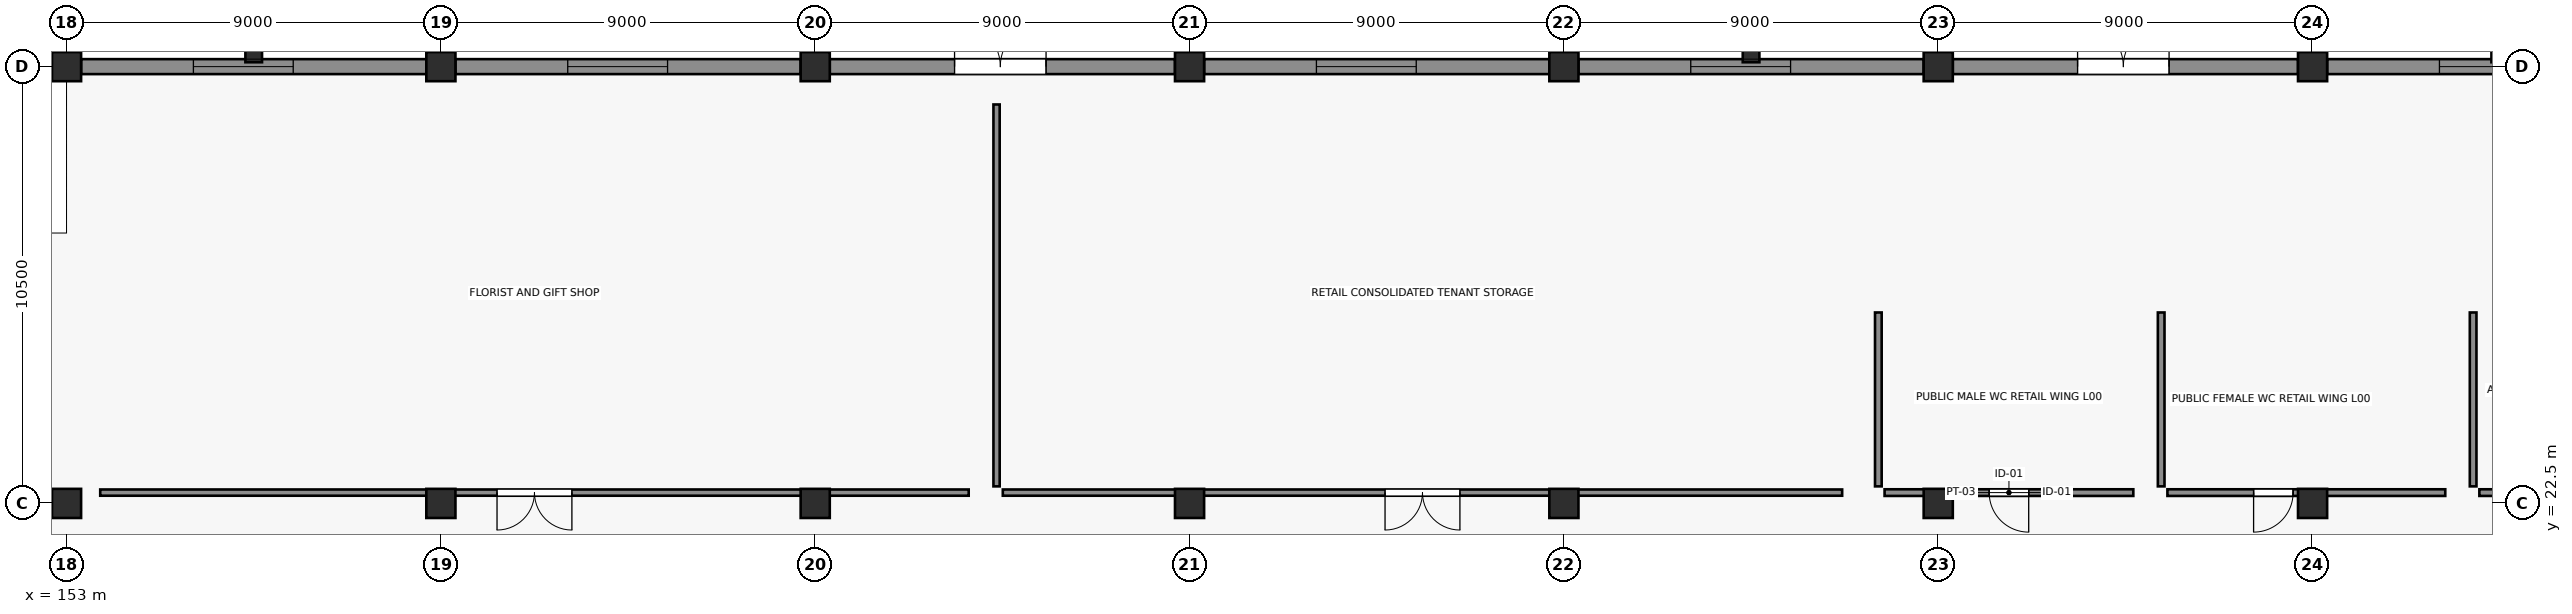
"""IFC4 building model, lengths in metres.
Left out: names, types, materials, properties, quantities, classifications, styles, units other than length and angle.
Written with IfcOpenShell. Run it as: python <this file> out.ifc"""

import sys

from ifc_helpers import new_model, si_unit, direction, frame, frame_2d, origin, origin_2d, place, context, subcontext, project, spatial, rectangle, extrude, element, fill, save


model = new_model("IFC4")
c1 = context("Model", 3, precision=1e-05, world=origin(), true_north=direction((0.0, 1.0)))
c2 = subcontext(c1, "Body", "Model", "MODEL_VIEW")
j1 = project(units=[si_unit("LENGTHUNIT", "METRE"), si_unit("PLANEANGLEUNIT", "RADIAN")], contexts=[c1])
p1 = place(None, origin())
s1 = spatial("IfcSite", under=j1, at=p1, CompositionType="ELEMENT")
p2 = place(p1, origin())
s2 = spatial("IfcBuilding", under=s1, at=p2, CompositionType="ELEMENT")
p3 = place(p2, origin())
s3 = spatial("IfcBuildingStorey", under=s2, at=p3, CompositionType="ELEMENT", Elevation=0.0)
for number, where, z_axis, x_axis in (
    (1, (153.0, 22.5, 0.0), (0.0, 0.0, 1.0), (1.0, 0.0, 0.0)),
    (2, (153.0, 33.0, 0.0), (0.0, 0.0, 1.0), (1.0, 0.0, 0.0)),
    (3, (162.0, 22.5, 0.0), (0.0, 0.0, 1.0), (1.0, 0.0, 0.0)),
    (4, (162.0, 33.0, 0.0), (0.0, 0.0, 1.0), (1.0, 0.0, 0.0)),
    (5, (171.0, 22.5, 0.0), (0.0, 0.0, 1.0), (1.0, 0.0, 0.0)),
    (6, (171.0, 33.0, 0.0), (0.0, 0.0, 1.0), (1.0, 0.0, 0.0)),
    (7, (180.0, 22.5, 0.0), (0.0, 0.0, 1.0), (1.0, 0.0, 0.0)),
    (8, (180.0, 33.0, 0.0), (0.0, 0.0, 1.0), (1.0, 0.0, 0.0)),
    (9, (189.0, 22.5, 0.0), (0.0, 0.0, 1.0), (1.0, 0.0, 0.0)),
    (10, (189.0, 33.0, 0.0), (0.0, 0.0, 1.0), (1.0, 0.0, 0.0)),
    (11, (198.0, 22.5, 0.0), (0.0, 0.0, 1.0), (1.0, 0.0, 0.0)),
    (12, (198.0, 33.0, 0.0), (0.0, 0.0, 1.0), (1.0, 0.0, 0.0)),
    (13, (207.0, 22.5, 0.0), (0.0, 0.0, 1.0), (1.0, 0.0, 0.0)),
    (14, (207.0, 33.0, 0.0), (0.0, 0.0, 1.0), (1.0, 0.0, 0.0)),
):
    element("IfcColumn", number, at=place(p3, frame(where, z_axis=z_axis, x_axis=x_axis)), inside=s3, PredefinedType="COLUMN", context=c2, shape_type="SweptSolid", body=[
        extrude(rectangle(XDim=0.7, YDim=0.7, at=origin_2d()), origin(), (0.0, 0.0, 1.0), 4.605),
    ])
for number, where, z_axis, x_axis in (
    (15, (157.5, 33.38, 0.0), (0.0, 0.0, 1.0), (1.0, 0.0, 0.0)),
    (16, (193.5, 33.38, 0.0), (0.0, 0.0, 1.0), (1.0, 0.0, 0.0)),
    (17, (211.5, 33.38, 0.0), (0.0, 0.0, 1.0), (1.0, 0.0, 0.0)),
):
    element("IfcColumn", number, at=place(p3, frame(where, z_axis=z_axis, x_axis=x_axis)), inside=s3, PredefinedType="PILASTER", context=c2, shape_type="SweptSolid", body=[
        extrude(rectangle(XDim=0.4, YDim=0.55, at=origin_2d()), origin(), (0.0, 0.0, 1.0), 4.8),
    ])
p4 = place(p3, frame((153.35, 33.0, 0.0), z_axis=(0.0, 0.0, 1.0), x_axis=(1.0, 0.0, 0.0)))
e18 = element("IfcWall", 18, at=p4, inside=s3, PredefinedType="SOLIDWALL", context=c2, shape_type="SweptSolid", body=[
    extrude(rectangle(XDim=8.3, YDim=0.36, at=frame_2d((4.15, 0.0))), origin(), (0.0, 0.0, 1.0), 4.15),
])
p5 = place(p4, frame((2.7, 0.0, 1.1)))
e19 = element("IfcOpeningElement", 19, at=p5, cuts=e18, PredefinedType="OPENING", context=c2, shape_type="SweptSolid", body=[
    extrude(rectangle(XDim=2.4, YDim=1.6, at=frame_2d((1.2, 0.8))), frame((0.0, 0.19, 0.0), z_axis=(0.0, -1.0, 0.0), x_axis=(1.0, 0.0, 0.0)), (0.0, 0.0, 1.0), 0.38),
])
p6 = place(p3, frame((162.35, 33.0, 0.0), z_axis=(0.0, 0.0, 1.0), x_axis=(1.0, 0.0, 0.0)))
e20 = element("IfcWall", 20, at=p6, inside=s3, PredefinedType="SOLIDWALL", context=c2, shape_type="SweptSolid", body=[
    extrude(rectangle(XDim=8.3, YDim=0.36, at=frame_2d((4.15, 0.0))), origin(), (0.0, 0.0, 1.0), 4.15),
])
p7 = place(p6, frame((2.7, 0.0, 1.1)))
e21 = element("IfcOpeningElement", 21, at=p7, cuts=e20, PredefinedType="OPENING", context=c2, shape_type="SweptSolid", body=[
    extrude(rectangle(XDim=2.4, YDim=1.6, at=frame_2d((1.2, 0.8))), frame((0.0, 0.19, 0.0), z_axis=(0.0, -1.0, 0.0), x_axis=(1.0, 0.0, 0.0)), (0.0, 0.0, 1.0), 0.38),
])
p8 = place(p3, frame((171.35, 33.0, 0.0), z_axis=(0.0, 0.0, 1.0), x_axis=(1.0, 0.0, 0.0)))
e22 = element("IfcWall", 22, at=p8, inside=s3, PredefinedType="SOLIDWALL", context=c2, shape_type="SweptSolid", body=[
    extrude(rectangle(XDim=8.3, YDim=0.36, at=frame_2d((4.15, 0.0))), origin(), (0.0, 0.0, 1.0), 4.15),
])
p9 = place(p8, frame((3.0, 0.0, 0.0)))
e23 = element("IfcOpeningElement", 23, at=p9, cuts=e22, PredefinedType="OPENING", context=c2, shape_type="SweptSolid", body=[
    extrude(rectangle(XDim=2.2, YDim=2.4, at=frame_2d((1.1, 1.2))), frame((0.0, 0.19, 0.0), z_axis=(0.0, -1.0, 0.0), x_axis=(1.0, 0.0, 0.0)), (0.0, 0.0, 1.0), 0.38),
])
p10 = place(p3, frame((180.35, 33.0, 0.0), z_axis=(0.0, 0.0, 1.0), x_axis=(1.0, 0.0, 0.0)))
e24 = element("IfcWall", 24, at=p10, inside=s3, PredefinedType="SOLIDWALL", context=c2, shape_type="SweptSolid", body=[
    extrude(rectangle(XDim=8.3, YDim=0.36, at=frame_2d((4.15, 0.0))), origin(), (0.0, 0.0, 1.0), 4.15),
])
p11 = place(p10, frame((2.7, 0.0, 1.1)))
e25 = element("IfcOpeningElement", 25, at=p11, cuts=e24, PredefinedType="OPENING", context=c2, shape_type="SweptSolid", body=[
    extrude(rectangle(XDim=2.4, YDim=1.6, at=frame_2d((1.2, 0.8))), frame((0.0, 0.19, 0.0), z_axis=(0.0, -1.0, 0.0), x_axis=(1.0, 0.0, 0.0)), (0.0, 0.0, 1.0), 0.38),
])
p12 = place(p3, frame((189.35, 33.0, 0.0), z_axis=(0.0, 0.0, 1.0), x_axis=(1.0, 0.0, 0.0)))
e26 = element("IfcWall", 26, at=p12, inside=s3, PredefinedType="SOLIDWALL", context=c2, shape_type="SweptSolid", body=[
    extrude(rectangle(XDim=8.3, YDim=0.36, at=frame_2d((4.15, 0.0))), origin(), (0.0, 0.0, 1.0), 4.15),
])
p13 = place(p12, frame((2.7, 0.0, 1.1)))
e27 = element("IfcOpeningElement", 27, at=p13, cuts=e26, PredefinedType="OPENING", context=c2, shape_type="SweptSolid", body=[
    extrude(rectangle(XDim=2.4, YDim=1.6, at=frame_2d((1.2, 0.8))), frame((0.0, 0.19, 0.0), z_axis=(0.0, -1.0, 0.0), x_axis=(1.0, 0.0, 0.0)), (0.0, 0.0, 1.0), 0.38),
])
p14 = place(p3, frame((198.35, 33.0, 0.0), z_axis=(0.0, 0.0, 1.0), x_axis=(1.0, 0.0, 0.0)))
e28 = element("IfcWall", 28, at=p14, inside=s3, PredefinedType="SOLIDWALL", context=c2, shape_type="SweptSolid", body=[
    extrude(rectangle(XDim=8.3, YDim=0.36, at=frame_2d((4.15, 0.0))), origin(), (0.0, 0.0, 1.0), 4.15),
])
p15 = place(p14, frame((3.0, 0.0, 0.0)))
e29 = element("IfcOpeningElement", 29, at=p15, cuts=e28, PredefinedType="OPENING", context=c2, shape_type="SweptSolid", body=[
    extrude(rectangle(XDim=2.2, YDim=2.4, at=frame_2d((1.1, 1.2))), frame((0.0, 0.19, 0.0), z_axis=(0.0, -1.0, 0.0), x_axis=(1.0, 0.0, 0.0)), (0.0, 0.0, 1.0), 0.38),
])
p16 = place(p3, frame((207.35, 33.0, 0.0), z_axis=(0.0, 0.0, 1.0), x_axis=(1.0, 0.0, 0.0)))
e30 = element("IfcWall", 30, at=p16, inside=s3, PredefinedType="SOLIDWALL", context=c2, shape_type="SweptSolid", body=[
    extrude(rectangle(XDim=8.3, YDim=0.36, at=frame_2d((4.15, 0.0))), origin(), (0.0, 0.0, 1.0), 4.15),
])
p17 = place(p16, frame((2.7, 0.0, 1.1)))
e31 = element("IfcOpeningElement", 31, at=p17, cuts=e30, PredefinedType="OPENING", context=c2, shape_type="SweptSolid", body=[
    extrude(rectangle(XDim=2.4, YDim=1.6, at=frame_2d((1.2, 0.8))), frame((0.0, 0.19, 0.0), z_axis=(0.0, -1.0, 0.0), x_axis=(1.0, 0.0, 0.0)), (0.0, 0.0, 1.0), 0.38),
])
p18 = place(p3, frame((174.69, 22.76, 0.0), z_axis=(0.0, 0.0, 1.0), x_axis=(-1.0, 0.0, 0.0)))
e32 = element("IfcWall", 32, at=p18, inside=s3, PredefinedType="PARTITIONING", context=c2, shape_type="SweptSolid", body=[
    extrude(rectangle(XDim=20.88, YDim=0.15, at=frame_2d((10.44, 0.0))), origin(), (0.0, 0.0, 1.0), 3.975),
])
p19 = place(p18, frame((9.54, 0.0, 0.0)))
e33 = element("IfcOpeningElement", 33, at=p19, cuts=e32, PredefinedType="OPENING", context=c2, shape_type="SweptSolid", body=[
    extrude(rectangle(XDim=1.8, YDim=2.3, at=frame_2d((0.9, 1.15))), frame((0.0, 0.085, 0.0), z_axis=(0.0, -1.0, 0.0), x_axis=(1.0, 0.0, 0.0)), (0.0, 0.0, 1.0), 0.17),
])
p20 = place(p3, frame((195.69, 22.76, 0.0), z_axis=(0.0, 0.0, 1.0), x_axis=(-1.0, 0.0, 0.0)))
e34 = element("IfcWall", 34, at=p20, inside=s3, PredefinedType="PARTITIONING", context=c2, shape_type="SweptSolid", body=[
    extrude(rectangle(XDim=20.18, YDim=0.15, at=frame_2d((10.09, 0.0))), origin(), (0.0, 0.0, 1.0), 3.975),
])
p21 = place(p20, frame((9.19, 0.0, 0.0)))
e35 = element("IfcOpeningElement", 35, at=p21, cuts=e34, PredefinedType="OPENING", context=c2, shape_type="SweptSolid", body=[
    extrude(rectangle(XDim=1.8, YDim=2.3, at=frame_2d((0.9, 1.15))), frame((0.0, 0.085, 0.0), z_axis=(0.0, -1.0, 0.0), x_axis=(1.0, 0.0, 0.0)), (0.0, 0.0, 1.0), 0.17),
])
p22 = place(p3, frame((175.36, 22.91, 0.0), z_axis=(0.0, 0.0, 1.0), x_axis=(0.0, 1.0, 0.0)))
e36 = element("IfcWall", 36, at=p22, inside=s3, PredefinedType="PARTITIONING", context=c2, shape_type="SweptSolid", body=[
    extrude(rectangle(XDim=9.18, YDim=0.15, at=frame_2d((4.59, 0.0))), origin(), (0.0, 0.0, 1.0), 4.55),
])
p23 = place(p3, frame((202.69, 22.76, 0.0), z_axis=(0.0, 0.0, 1.0), x_axis=(-1.0, 0.0, 0.0)))
e37 = element("IfcWall", 37, at=p23, inside=s3, PredefinedType="PARTITIONING", context=c2, shape_type="SweptSolid", body=[
    extrude(rectangle(XDim=5.98, YDim=0.16, at=frame_2d((2.99, 0.0))), origin(), (0.0, 0.0, 1.0), 3.975),
])
p24 = place(p23, frame((2.515, 0.0, 0.0)))
e38 = element("IfcOpeningElement", 38, at=p24, cuts=e37, PredefinedType="OPENING", context=c2, shape_type="SweptSolid", body=[
    extrude(rectangle(XDim=0.95, YDim=2.15, at=frame_2d((0.475, 1.075))), frame((0.0, 0.09, 0.0), z_axis=(0.0, -1.0, 0.0), x_axis=(1.0, 0.0, 0.0)), (0.0, 0.0, 1.0), 0.18),
])
p25 = place(p3, frame((196.56, 22.91, 0.0), z_axis=(0.0, 0.0, 1.0), x_axis=(0.0, 1.0, 0.0)))
e39 = element("IfcWall", 39, at=p25, inside=s3, PredefinedType="PARTITIONING", context=c2, shape_type="SweptSolid", body=[
    extrude(rectangle(XDim=4.18, YDim=0.16, at=frame_2d((2.09, 0.0))), origin(), (0.0, 0.0, 1.0), 4.55),
])
p26 = place(p3, frame((210.19, 22.76, 0.0), z_axis=(0.0, 0.0, 1.0), x_axis=(-1.0, 0.0, 0.0)))
e40 = element("IfcWall", 40, at=p26, inside=s3, PredefinedType="PARTITIONING", context=c2, shape_type="SweptSolid", body=[
    extrude(rectangle(XDim=6.68, YDim=0.16, at=frame_2d((3.34, 0.0))), origin(), (0.0, 0.0, 1.0), 3.975),
])
p27 = place(p26, frame((3.658, 0.0, 0.0)))
e41 = element("IfcOpeningElement", 41, at=p27, cuts=e40, PredefinedType="OPENING", context=c2, shape_type="SweptSolid", body=[
    extrude(rectangle(XDim=0.95, YDim=2.15, at=frame_2d((0.475, 1.075))), frame((0.0, 0.09, 0.0), z_axis=(0.0, -1.0, 0.0), x_axis=(1.0, 0.0, 0.0)), (0.0, 0.0, 1.0), 0.18),
])
p28 = place(p3, frame((203.36, 22.91, 0.0), z_axis=(0.0, 0.0, 1.0), x_axis=(0.0, 1.0, 0.0)))
e42 = element("IfcWall", 42, at=p28, inside=s3, PredefinedType="PARTITIONING", context=c2, shape_type="SweptSolid", body=[
    extrude(rectangle(XDim=4.18, YDim=0.16, at=frame_2d((2.09, 0.0))), origin(), (0.0, 0.0, 1.0), 4.55),
])
p29 = place(p3, frame((215.19, 22.76, 0.0), z_axis=(0.0, 0.0, 1.0), x_axis=(-1.0, 0.0, 0.0)))
e43 = element("IfcWall", 43, at=p29, inside=s3, PredefinedType="PARTITIONING", context=c2, shape_type="SweptSolid", body=[
    extrude(rectangle(XDim=4.18, YDim=0.16, at=frame_2d((2.09, 0.0))), origin(), (0.0, 0.0, 1.0), 3.975),
])
p30 = place(p29, frame((1.565, 0.0, 0.0)))
e44 = element("IfcOpeningElement", 44, at=p30, cuts=e43, PredefinedType="OPENING", context=c2, shape_type="SweptSolid", body=[
    extrude(rectangle(XDim=1.05, YDim=2.2, at=frame_2d((0.525, 1.1))), frame((0.0, 0.09, 0.0), z_axis=(0.0, -1.0, 0.0), x_axis=(1.0, 0.0, 0.0)), (0.0, 0.0, 1.0), 0.18),
])
p31 = place(p3, frame((210.86, 22.91, 0.0), z_axis=(0.0, 0.0, 1.0), x_axis=(0.0, 1.0, 0.0)))
e45 = element("IfcWall", 45, at=p31, inside=s3, PredefinedType="PARTITIONING", context=c2, shape_type="SweptSolid", body=[
    extrude(rectangle(XDim=4.18, YDim=0.16, at=frame_2d((2.09, 0.0))), origin(), (0.0, 0.0, 1.0), 4.55),
])
p32 = place(p5, origin())
e46 = element("IfcWindow", 46, at=p32, inside=s3, PartitioningType="SINGLE_PANEL", PredefinedType="WINDOW", context=c2, shape_type="SweptSolid", body=[
    extrude(rectangle(XDim=2.4, YDim=1.6, at=frame_2d((1.2, 0.8))), frame((0.0, 0.03, 0.0), z_axis=(0.0, -1.0, 0.0), x_axis=(1.0, 0.0, 0.0)), (0.0, 0.0, 1.0), 0.06),
])
fill(e19, e46)
p33 = place(p7, origin())
e47 = element("IfcWindow", 47, at=p33, inside=s3, PartitioningType="SINGLE_PANEL", PredefinedType="WINDOW", context=c2, shape_type="SweptSolid", body=[
    extrude(rectangle(XDim=2.4, YDim=1.6, at=frame_2d((1.2, 0.8))), frame((0.0, 0.03, 0.0), z_axis=(0.0, -1.0, 0.0), x_axis=(1.0, 0.0, 0.0)), (0.0, 0.0, 1.0), 0.06),
])
fill(e21, e47)
p34 = place(p9, origin())
e48 = element("IfcDoor", 48, at=p34, inside=s3, OperationType="DOUBLE_DOOR_SINGLE_SWING", PredefinedType="DOOR", context=c2, shape_type="SweptSolid", body=[
    extrude(rectangle(XDim=2.2, YDim=2.4, at=frame_2d((1.1, 1.2))), frame((0.0, 0.025, 0.0), z_axis=(0.0, -1.0, 0.0), x_axis=(1.0, 0.0, 0.0)), (0.0, 0.0, 1.0), 0.05),
])
fill(e23, e48)
p35 = place(p11, origin())
e49 = element("IfcWindow", 49, at=p35, inside=s3, PartitioningType="SINGLE_PANEL", PredefinedType="WINDOW", context=c2, shape_type="SweptSolid", body=[
    extrude(rectangle(XDim=2.4, YDim=1.6, at=frame_2d((1.2, 0.8))), frame((0.0, 0.03, 0.0), z_axis=(0.0, -1.0, 0.0), x_axis=(1.0, 0.0, 0.0)), (0.0, 0.0, 1.0), 0.06),
])
fill(e25, e49)
p36 = place(p13, origin())
e50 = element("IfcWindow", 50, at=p36, inside=s3, PartitioningType="SINGLE_PANEL", PredefinedType="WINDOW", context=c2, shape_type="SweptSolid", body=[
    extrude(rectangle(XDim=2.4, YDim=1.6, at=frame_2d((1.2, 0.8))), frame((0.0, 0.03, 0.0), z_axis=(0.0, -1.0, 0.0), x_axis=(1.0, 0.0, 0.0)), (0.0, 0.0, 1.0), 0.06),
])
fill(e27, e50)
p37 = place(p15, origin())
e51 = element("IfcDoor", 51, at=p37, inside=s3, OperationType="DOUBLE_DOOR_SINGLE_SWING", PredefinedType="DOOR", context=c2, shape_type="SweptSolid", body=[
    extrude(rectangle(XDim=2.2, YDim=2.4, at=frame_2d((1.1, 1.2))), frame((0.0, 0.025, 0.0), z_axis=(0.0, -1.0, 0.0), x_axis=(1.0, 0.0, 0.0)), (0.0, 0.0, 1.0), 0.05),
])
fill(e29, e51)
p38 = place(p17, origin())
e52 = element("IfcWindow", 52, at=p38, inside=s3, PartitioningType="SINGLE_PANEL", PredefinedType="WINDOW", context=c2, shape_type="SweptSolid", body=[
    extrude(rectangle(XDim=2.4, YDim=1.6, at=frame_2d((1.2, 0.8))), frame((0.0, 0.03, 0.0), z_axis=(0.0, -1.0, 0.0), x_axis=(1.0, 0.0, 0.0)), (0.0, 0.0, 1.0), 0.06),
])
fill(e31, e52)
p39 = place(p19, origin())
e53 = element("IfcDoor", 53, at=p39, inside=s3, OperationType="DOUBLE_DOOR_SINGLE_SWING", PredefinedType="DOOR", context=c2, shape_type="SweptSolid", body=[
    extrude(rectangle(XDim=1.8, YDim=2.3, at=frame_2d((0.9, 1.15))), frame((0.0, 0.025, 0.0), z_axis=(0.0, -1.0, 0.0), x_axis=(1.0, 0.0, 0.0)), (0.0, 0.0, 1.0), 0.05),
])
fill(e33, e53)
p40 = place(p21, origin())
e54 = element("IfcDoor", 54, at=p40, inside=s3, OperationType="DOUBLE_DOOR_SINGLE_SWING", PredefinedType="DOOR", context=c2, shape_type="SweptSolid", body=[
    extrude(rectangle(XDim=1.8, YDim=2.3, at=frame_2d((0.9, 1.15))), frame((0.0, 0.025, 0.0), z_axis=(0.0, -1.0, 0.0), x_axis=(1.0, 0.0, 0.0)), (0.0, 0.0, 1.0), 0.05),
])
fill(e35, e54)
p41 = place(p24, origin())
e55 = element("IfcDoor", 55, at=p41, inside=s3, OperationType="SINGLE_SWING_LEFT", PredefinedType="DOOR", context=c2, shape_type="SweptSolid", body=[
    extrude(rectangle(XDim=0.95, YDim=2.15, at=frame_2d((0.475, 1.075))), frame((0.0, 0.025, 0.0), z_axis=(0.0, -1.0, 0.0), x_axis=(1.0, 0.0, 0.0)), (0.0, 0.0, 1.0), 0.05),
])
fill(e38, e55)
p42 = place(p27, origin())
e56 = element("IfcDoor", 56, at=p42, inside=s3, OperationType="SINGLE_SWING_RIGHT", PredefinedType="DOOR", context=c2, shape_type="SweptSolid", body=[
    extrude(rectangle(XDim=0.95, YDim=2.15, at=frame_2d((0.475, 1.075))), frame((0.0, 0.025, 0.0), z_axis=(0.0, -1.0, 0.0), x_axis=(1.0, 0.0, 0.0)), (0.0, 0.0, 1.0), 0.05),
])
fill(e41, e56)
save(model, sys.argv[1])
